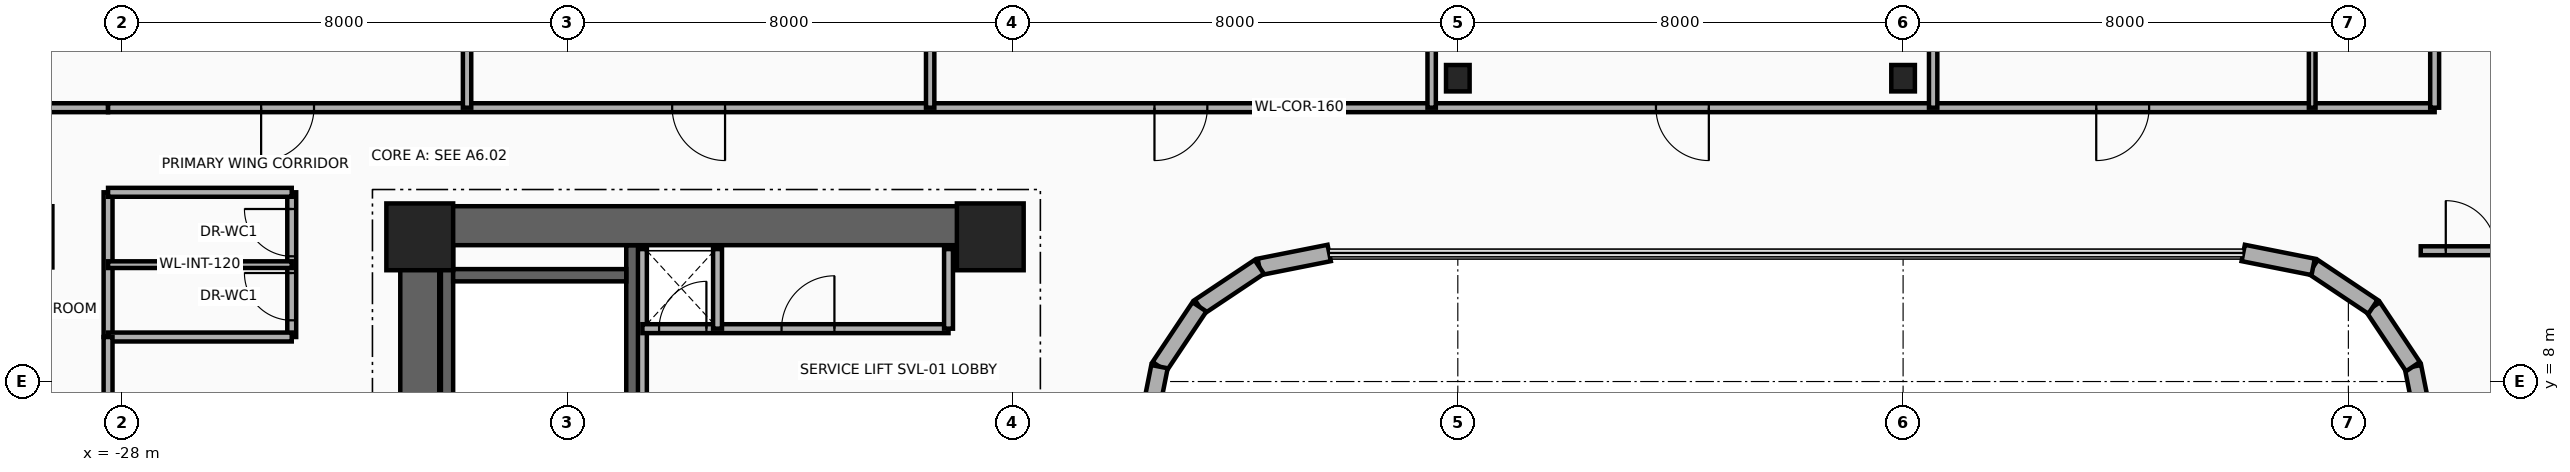
"""IFC4 building model, lengths in metres.
Left out: names, types, materials, properties, quantities, classifications, styles, units other than length and angle.
Written with IfcOpenShell. Run it as: python <this file> out.ifc"""

import sys

from ifc_helpers import new_model, si_unit, direction, frame, frame_2d, origin, origin_2d, place, context, subcontext, project, spatial, rectangle, i_section, extrude, source, transform, mapped, element, fill, save


model = new_model("IFC4")
c1 = context("Model", 3, precision=1e-05, world=origin(), true_north=direction((0.0, 1.0)))
c2 = subcontext(c1, "Body", "Model", "MODEL_VIEW")
j1 = project(units=[si_unit("LENGTHUNIT", "METRE"), si_unit("PLANEANGLEUNIT", "RADIAN")], contexts=[c1])
p1 = place(None, origin())
s1 = spatial("IfcSite", under=j1, at=p1, CompositionType="ELEMENT")
p2 = place(p1, origin())
s2 = spatial("IfcBuilding", under=s1, at=p2, CompositionType="ELEMENT")
p3 = place(p2, frame((0.0, 0.0, 113.1)))
s3 = spatial("IfcBuildingStorey", under=s2, at=p3, CompositionType="ELEMENT", Elevation=113.1)
for number, where, z_axis, x_axis in (
    (1, (-22.16, 1.78, 0.0), (0.0, 0.0, 1.0), (0.0, 1.0, 0.0)),
    (2, (-18.83, 1.78, 0.0), (0.0, 0.0, 1.0), (0.0, 1.0, 0.0)),
):
    element("IfcWall", number, at=place(p3, frame(where, z_axis=z_axis, x_axis=x_axis)), inside=s3, PredefinedType="SHEAR", context=c2, shape_type="SweptSolid", body=[
        extrude(rectangle(XDim=8.67, YDim=0.22, at=frame_2d((4.335, 0.0))), origin(), (0.0, 0.0, 1.0), 3.46),
    ])
p4 = place(p3, frame((-22.05, 9.91, 0.0), z_axis=(0.0, 0.0, 1.0), x_axis=(1.0, 0.0, 0.0)))
e3 = element("IfcWall", 3, at=p4, inside=s3, PredefinedType="SHEAR", context=c2, shape_type="SweptSolid", body=[
    extrude(rectangle(XDim=3.11, YDim=0.22, at=frame_2d((1.555, 0.0))), origin(), (0.0, 0.0, 1.0), 3.46),
])
p5 = place(p3, frame((-22.65, -11.15, 0.0), z_axis=(0.0, 0.0, 1.0), x_axis=(0.0, 1.0, 0.0)))
e4 = element("IfcWall", 4, at=p5, inside=s3, PredefinedType="SHEAR", context=c2, shape_type="SweptSolid", body=[
    extrude(rectangle(XDim=22.3, YDim=0.7, at=frame_2d((11.15, 0.0))), origin(), (0.0, 0.0, 1.0), 3.46),
])
p6 = place(p3, frame((-22.65, 10.8, 0.0), z_axis=(0.0, 0.0, 1.0), x_axis=(1.0, 0.0, 0.0)))
e5 = element("IfcWall", 5, at=p6, inside=s3, PredefinedType="SHEAR", context=c2, shape_type="SweptSolid", body=[
    extrude(rectangle(XDim=10.25, YDim=0.7, at=frame_2d((5.125, 0.0))), origin(), (0.0, 0.0, 1.0), 3.46),
])
m1 = source(origin(), c2, "Body", "SweptSolid", [
    extrude(rectangle(XDim=1.2, YDim=1.2, at=origin_2d()), origin(), (0.0, 0.0, 1.0), 3.7),
])
for number, where, z_axis, x_axis in (
    (6, (-22.65, 10.6, 0.0), (0.0, 0.0, 1.0), (1.0, 0.0, 0.0)),
    (7, (-12.4, 10.6, 0.0), (0.0, 0.0, 1.0), (1.0, 0.0, 0.0)),
):
    element("IfcColumn", number, at=place(p3, frame(where, z_axis=z_axis, x_axis=x_axis)), inside=s3, PredefinedType="COLUMN", context=c2, shape_type="MappedRepresentation", body=[
        mapped(m1, transform((0.0, 0.0, 0.0), x_axis=(1.0, 0.0, 0.0), y_axis=(0.0, 1.0, 0.0), z_axis=(0.0, 0.0, 1.0), scale=1.0)),
    ])
m2 = source(origin(), c2, "Body", "SweptSolid", [
    extrude(i_section(OverallWidth=0.424, OverallDepth=0.474, WebThickness=0.048, FlangeThickness=0.077, at=origin_2d()), origin(), (0.0, 0.0, 1.0), 3.7),
])
for number, where, z_axis, x_axis in (
    (8, (-4.0, 13.45, 0.0), (0.0, 0.0, 1.0), (1.0, 0.0, 0.0)),
    (9, (4.0, 13.45, 0.0), (0.0, 0.0, 1.0), (1.0, 0.0, 0.0)),
):
    element("IfcColumn", number, at=place(p3, frame(where, z_axis=z_axis, x_axis=x_axis)), inside=s3, PredefinedType="COLUMN", context=c2, shape_type="MappedRepresentation", body=[
        mapped(m2, transform((0.0, 0.0, 0.0), x_axis=(1.0, 0.0, 0.0), y_axis=(0.0, 1.0, 0.0), z_axis=(0.0, 0.0, 1.0), scale=1.0)),
    ])
p7 = place(p3, frame((13.41, 7.011, 0.0), z_axis=(0.0, 0.0, 1.0), x_axis=(-0.195090163074, 0.980785312019, 0.0)))
e10 = element("IfcWall", 10, at=p7, inside=s3, PredefinedType="SOLIDWALL", context=c2, shape_type="SweptSolid", body=[
    extrude(rectangle(XDim=1.281, YDim=0.3, at=frame_2d((0.641, 0.0))), origin(), (0.0, 0.0, 1.0), 3.46),
])
for number, where, z_axis, x_axis in (
    (11, (13.16, 8.268, 0.0), (0.0, 0.0, 1.0), (-0.556, 0.831, 0.0)),
    (12, (12.442, 9.342, 0.0), (0.0, 0.0, 1.0), (-0.831, 0.556, 0.0)),
):
    element("IfcWall", number, at=place(p3, frame(where, z_axis=z_axis, x_axis=x_axis)), inside=s3, PredefinedType="SOLIDWALL", context=c2, shape_type="SweptSolid", body=[
        extrude(rectangle(XDim=1.292, YDim=0.3, at=frame_2d((0.646, 0.0))), origin(), (0.0, 0.0, 1.0), 3.46),
    ])
for number, where, z_axis, x_axis in (
    (13, (11.367, 10.06, 0.0), (0.0, 0.0, 1.0), (-0.981, 0.195, 0.0)),
    (14, (-6.311, 10.31, 0.0), (0.0, 0.0, 1.0), (-0.981, -0.195, 0.0)),
):
    element("IfcWall", number, at=place(p3, frame(where, z_axis=z_axis, x_axis=x_axis)), inside=s3, PredefinedType="SOLIDWALL", context=c2, shape_type="SweptSolid", body=[
        extrude(rectangle(XDim=1.281, YDim=0.3, at=frame_2d((0.641, 0.0))), origin(), (0.0, 0.0, 1.0), 3.46),
    ])
p8 = place(p3, frame((-7.567, 10.06, 0.0), z_axis=(0.0, 0.0, 1.0), x_axis=(-0.831497739511, -0.555528135371, 0.0)))
e15 = element("IfcWall", 15, at=p8, inside=s3, PredefinedType="SOLIDWALL", context=c2, shape_type="SweptSolid", body=[
    extrude(rectangle(XDim=1.292, YDim=0.3, at=frame_2d((0.646, 0.0))), origin(), (0.0, 0.0, 1.0), 3.46),
])
p9 = place(p3, frame((-8.642, 9.342, 0.0), z_axis=(0.0, 0.0, 1.0), x_axis=(-0.555615398575, -0.831439431869, 0.0)))
e16 = element("IfcWall", 16, at=p9, inside=s3, PredefinedType="SOLIDWALL", context=c2, shape_type="SweptSolid", body=[
    extrude(rectangle(XDim=1.292, YDim=0.3, at=frame_2d((0.646, 0.0))), origin(), (0.0, 0.0, 1.0), 3.46),
])
p10 = place(p3, frame((-9.36, 8.268, 0.0), z_axis=(0.0, 0.0, 1.0), x_axis=(-0.195090163074, -0.980785312019, 0.0)))
e17 = element("IfcWall", 17, at=p10, inside=s3, PredefinedType="SOLIDWALL", context=c2, shape_type="SweptSolid", body=[
    extrude(rectangle(XDim=1.281, YDim=0.3, at=frame_2d((0.641, 0.0))), origin(), (0.0, 0.0, 1.0), 3.46),
])
p11 = place(p3, frame((-18.65, 7.45, 0.0), z_axis=(0.0, 0.0, 1.0), x_axis=(0.0, 1.0, 0.0)))
e18 = element("IfcWall", 18, at=p11, inside=s3, PredefinedType="PARTITIONING", context=c2, shape_type="SweptSolid", body=[
    extrude(rectangle(XDim=2.93, YDim=0.16, at=frame_2d((1.465, 0.0))), origin(), (0.0, 0.0, 1.0), 3.46),
])
p12 = place(p3, frame((-18.65, 8.95, 0.0), z_axis=(0.0, 0.0, 1.0), x_axis=(1.0, 0.0, 0.0)))
e19 = element("IfcWall", 19, at=p12, inside=s3, PredefinedType="PARTITIONING", context=c2, shape_type="SweptSolid", body=[
    extrude(rectangle(XDim=5.5, YDim=0.16, at=frame_2d((2.75, 0.0))), origin(), (0.0, 0.0, 1.0), 3.46),
])
p13 = place(p12, frame((0.3, 0.0, 0.0)))
e20 = element("IfcOpeningElement", 20, at=p13, cuts=e19, PredefinedType="OPENING", context=c2, shape_type="SweptSolid", body=[
    extrude(rectangle(XDim=0.85, YDim=2.05, at=frame_2d((0.425, 1.025))), frame((0.0, 0.095, 0.0), z_axis=(0.0, -1.0, 0.0), x_axis=(1.0, 0.0, 0.0)), (0.0, 0.0, 1.0), 0.19),
])
p14 = place(p12, frame((2.5, 0.0, 0.0)))
e21 = element("IfcOpeningElement", 21, at=p14, cuts=e19, PredefinedType="OPENING", context=c2, shape_type="SweptSolid", body=[
    extrude(rectangle(XDim=0.95, YDim=2.15, at=frame_2d((0.475, 1.075))), frame((0.0, 0.095, 0.0), z_axis=(0.0, -1.0, 0.0), x_axis=(1.0, 0.0, 0.0)), (0.0, 0.0, 1.0), 0.19),
])
for number, where, z_axis, x_axis in (
    (22, (-13.15, 8.95, 0.0), (0.0, 0.0, 1.0), (0.0, 1.0, 0.0)),
    (23, (-17.3, 8.95, 0.0), (0.0, 0.0, 1.0), (0.0, 1.0, 0.0)),
):
    element("IfcWall", number, at=place(p3, frame(where, z_axis=z_axis, x_axis=x_axis)), inside=s3, PredefinedType="PARTITIONING", context=c2, shape_type="SweptSolid", body=[
        extrude(rectangle(XDim=1.43, YDim=0.16, at=frame_2d((0.715, 0.0))), origin(), (0.0, 0.0, 1.0), 3.46),
    ])
p15 = place(p3, frame((-28.25, 8.8, 0.0), z_axis=(0.0, 0.0, 1.0), x_axis=(0.0, 1.0, 0.0)))
e24 = element("IfcWall", 24, at=p15, inside=s3, PredefinedType="PARTITIONING", context=c2, shape_type="SweptSolid", body=[
    extrude(rectangle(XDim=2.6, YDim=0.16, at=frame_2d((1.3, 0.0))), origin(), (0.0, 0.0, 1.0), 2.666),
])
p16 = place(p3, frame((-24.95, 8.8, 0.0), z_axis=(0.0, 0.0, 1.0), x_axis=(0.0, 1.0, 0.0)))
e25 = element("IfcWall", 25, at=p16, inside=s3, PredefinedType="PARTITIONING", context=c2, shape_type="SweptSolid", body=[
    extrude(rectangle(XDim=2.6, YDim=0.16, at=frame_2d((1.3, 0.0))), origin(), (0.0, 0.0, 1.0), 2.666),
])
p17 = place(p16, frame((0.3, 0.0, 0.0)))
e26 = element("IfcOpeningElement", 26, at=p17, cuts=e25, PredefinedType="OPENING", context=c2, shape_type="SweptSolid", body=[
    extrude(rectangle(XDim=0.85, YDim=2.1, at=frame_2d((0.425, 1.05))), frame((0.0, 0.095, 0.0), z_axis=(0.0, -1.0, 0.0), x_axis=(1.0, 0.0, 0.0)), (0.0, 0.0, 1.0), 0.19),
])
p18 = place(p16, frame((1.45, 0.0, 0.0)))
e27 = element("IfcOpeningElement", 27, at=p18, cuts=e25, PredefinedType="OPENING", context=c2, shape_type="SweptSolid", body=[
    extrude(rectangle(XDim=0.85, YDim=2.1, at=frame_2d((0.425, 1.05))), frame((0.0, 0.095, 0.0), z_axis=(0.0, -1.0, 0.0), x_axis=(1.0, 0.0, 0.0)), (0.0, 0.0, 1.0), 0.19),
])
for number, where, z_axis, x_axis in (
    (28, (-28.25, 8.8, 0.0), (0.0, 0.0, 1.0), (1.0, 0.0, 0.0)),
    (29, (-28.25, 11.4, 0.0), (0.0, 0.0, 1.0), (1.0, 0.0, 0.0)),
):
    element("IfcWall", number, at=place(p3, frame(where, z_axis=z_axis, x_axis=x_axis)), inside=s3, PredefinedType="PARTITIONING", context=c2, shape_type="SweptSolid", body=[
        extrude(rectangle(XDim=3.3, YDim=0.16, at=frame_2d((1.65, 0.0))), origin(), (0.0, 0.0, 1.0), 3.46),
    ])
p19 = place(p3, frame((-28.25, 10.1, 0.0), z_axis=(0.0, 0.0, 1.0), x_axis=(1.0, 0.0, 0.0)))
e30 = element("IfcWall", 30, at=p19, inside=s3, PredefinedType="PARTITIONING", context=c2, shape_type="SweptSolid", body=[
    extrude(rectangle(XDim=3.3, YDim=0.12, at=frame_2d((1.65, 0.0))), origin(), (0.0, 0.0, 1.0), 3.46),
])
p20 = place(p3, frame((-28.25, 5.8, 0.0), z_axis=(0.0, 0.0, 1.0), x_axis=(0.0, 1.0, 0.0)))
e31 = element("IfcWall", 31, at=p20, inside=s3, PredefinedType="PARTITIONING", context=c2, shape_type="SweptSolid", body=[
    extrude(rectangle(XDim=3.0, YDim=0.16, at=frame_2d((1.5, 0.0))), origin(), (0.0, 0.0, 1.0), 2.988),
])
p21 = place(p3, frame((-30.89, 12.92, 0.0), z_axis=(0.0, 0.0, 1.0), x_axis=(1.0, 0.0, 0.0)))
e32 = element("IfcWall", 32, at=p21, inside=s3, PredefinedType="PARTITIONING", context=c2, shape_type="SweptSolid", body=[
    extrude(rectangle(XDim=2.64, YDim=0.16, at=frame_2d((1.32, 0.0))), origin(), (0.0, 0.0, 1.0), 2.896),
])
p22 = place(p3, frame((-28.25, 12.92, 0.0), z_axis=(0.0, 0.0, 1.0), x_axis=(1.0, 0.0, 0.0)))
e33 = element("IfcWall", 33, at=p22, inside=s3, PredefinedType="PARTITIONING", context=c2, shape_type="SweptSolid", body=[
    extrude(rectangle(XDim=41.8, YDim=0.16, at=frame_2d((20.9, 0.0))), origin(), (0.0, 0.0, 1.0), 2.666),
])
p23 = place(p22, frame((2.75, 0.0, 0.0)))
e34 = element("IfcOpeningElement", 34, at=p23, cuts=e33, PredefinedType="OPENING", context=c2, shape_type="SweptSolid", body=[
    extrude(rectangle(XDim=0.95, YDim=2.15, at=frame_2d((0.475, 1.075))), frame((0.0, 0.095, 0.0), z_axis=(0.0, -1.0, 0.0), x_axis=(1.0, 0.0, 0.0)), (0.0, 0.0, 1.0), 0.19),
])
p24 = place(p22, frame((10.135, 0.0, 0.0)))
e35 = element("IfcOpeningElement", 35, at=p24, cuts=e33, PredefinedType="OPENING", context=c2, shape_type="SweptSolid", body=[
    extrude(rectangle(XDim=0.95, YDim=2.15, at=frame_2d((0.475, 1.075))), frame((0.0, 0.095, 0.0), z_axis=(0.0, -1.0, 0.0), x_axis=(1.0, 0.0, 0.0)), (0.0, 0.0, 1.0), 0.19),
])
p25 = place(p22, frame((18.8, 0.0, 0.0)))
e36 = element("IfcOpeningElement", 36, at=p25, cuts=e33, PredefinedType="OPENING", context=c2, shape_type="SweptSolid", body=[
    extrude(rectangle(XDim=0.95, YDim=2.15, at=frame_2d((0.475, 1.075))), frame((0.0, 0.095, 0.0), z_axis=(0.0, -1.0, 0.0), x_axis=(1.0, 0.0, 0.0)), (0.0, 0.0, 1.0), 0.19),
])
p26 = place(p22, frame((27.81, 0.0, 0.0)))
e37 = element("IfcOpeningElement", 37, at=p26, cuts=e33, PredefinedType="OPENING", context=c2, shape_type="SweptSolid", body=[
    extrude(rectangle(XDim=0.95, YDim=2.15, at=frame_2d((0.475, 1.075))), frame((0.0, 0.095, 0.0), z_axis=(0.0, -1.0, 0.0), x_axis=(1.0, 0.0, 0.0)), (0.0, 0.0, 1.0), 0.19),
])
p27 = place(p22, frame((35.72, 0.0, 0.0)))
e38 = element("IfcOpeningElement", 38, at=p27, cuts=e33, PredefinedType="OPENING", context=c2, shape_type="SweptSolid", body=[
    extrude(rectangle(XDim=0.95, YDim=2.15, at=frame_2d((0.475, 1.075))), frame((0.0, 0.095, 0.0), z_axis=(0.0, -1.0, 0.0), x_axis=(1.0, 0.0, 0.0)), (0.0, 0.0, 1.0), 0.19),
])
p28 = place(p3, frame((13.55, 12.92, 0.0), z_axis=(0.0, 0.0, 1.0), x_axis=(0.0, 1.0, 0.0)))
e39 = element("IfcWall", 39, at=p28, inside=s3, PredefinedType="PARTITIONING", context=c2, shape_type="SweptSolid", body=[
    extrude(rectangle(XDim=5.857, YDim=0.16, at=frame_2d((2.928, 0.0))), origin(), (0.0, 0.0, 1.0), 2.666),
])
p29 = place(p3, frame((-21.8, 12.92, 0.0), z_axis=(0.0, 0.0, 1.0), x_axis=(0.0, 1.0, 0.0)))
e40 = element("IfcWall", 40, at=p29, inside=s3, PredefinedType="PARTITIONING", context=c2, shape_type="SweptSolid", body=[
    extrude(rectangle(XDim=6.552, YDim=0.15, at=frame_2d((3.276, 0.0))), origin(), (0.0, 0.0, 1.0), 2.666),
])
p30 = place(p3, frame((-13.48, 12.92, 0.0), z_axis=(0.0, 0.0, 1.0), x_axis=(0.0, 1.0, 0.0)))
e41 = element("IfcWall", 41, at=p30, inside=s3, PredefinedType="PARTITIONING", context=c2, shape_type="SweptSolid", body=[
    extrude(rectangle(XDim=7.259, YDim=0.15, at=frame_2d((3.629, 0.0))), origin(), (0.0, 0.0, 1.0), 2.666),
])
p31 = place(p3, frame((-4.47, 12.92, 0.0), z_axis=(0.0, 0.0, 1.0), x_axis=(0.0, 1.0, 0.0)))
e42 = element("IfcWall", 42, at=p31, inside=s3, PredefinedType="PARTITIONING", context=c2, shape_type="SweptSolid", body=[
    extrude(rectangle(XDim=7.173, YDim=0.15, at=frame_2d((3.586, 0.0))), origin(), (0.0, 0.0, 1.0), 2.666),
])
p32 = place(p3, frame((4.54, 12.92, 0.0), z_axis=(0.0, 0.0, 1.0), x_axis=(0.0, 1.0, 0.0)))
e43 = element("IfcWall", 43, at=p32, inside=s3, PredefinedType="PARTITIONING", context=c2, shape_type="SweptSolid", body=[
    extrude(rectangle(XDim=6.764, YDim=0.15, at=frame_2d((3.382, 0.0))), origin(), (0.0, 0.0, 1.0), 2.666),
])
p33 = place(p3, frame((11.35, 12.92, 0.0), z_axis=(0.0, 0.0, 1.0), x_axis=(0.0, 1.0, 0.0)))
e44 = element("IfcWall", 44, at=p33, inside=s3, PredefinedType="PARTITIONING", context=c2, shape_type="SweptSolid", body=[
    extrude(rectangle(XDim=2.0, YDim=0.12, at=frame_2d((1.0, 0.0))), origin(), (0.0, 0.0, 1.0), 2.666),
])
p34 = place(p3, frame((13.3, 10.35, 0.0), z_axis=(0.0, 0.0, 1.0), x_axis=(1.0, 0.0, 0.0)))
e45 = element("IfcWall", 45, at=p34, inside=s3, PredefinedType="PARTITIONING", context=c2, shape_type="SweptSolid", body=[
    extrude(rectangle(XDim=2.1, YDim=0.16, at=frame_2d((1.05, 0.0))), origin(), (0.0, 0.0, 1.0), 2.666),
])
p35 = place(p34, frame((0.45, 0.0, 0.0)))
e46 = element("IfcOpeningElement", 46, at=p35, cuts=e45, PredefinedType="OPENING", context=c2, shape_type="SweptSolid", body=[
    extrude(rectangle(XDim=0.9, YDim=2.1, at=frame_2d((0.45, 1.05))), frame((0.0, 0.095, 0.0), z_axis=(0.0, -1.0, 0.0), x_axis=(1.0, 0.0, 0.0)), (0.0, 0.0, 1.0), 0.19),
])
p36 = place(p13, origin())
e47 = element("IfcDoor", 47, at=p36, inside=s3, OperationType="SINGLE_SWING_LEFT", PredefinedType="DOOR", context=c2, shape_type="SweptSolid", body=[
    extrude(rectangle(XDim=0.85, YDim=2.05, at=frame_2d((0.425, 1.025))), frame((0.0, 0.025, 0.0), z_axis=(0.0, -1.0, 0.0), x_axis=(1.0, 0.0, 0.0)), (0.0, 0.0, 1.0), 0.05),
])
fill(e20, e47)
p37 = place(p14, origin())
e48 = element("IfcDoor", 48, at=p37, inside=s3, OperationType="SINGLE_SWING_RIGHT", PredefinedType="DOOR", context=c2, shape_type="SweptSolid", body=[
    extrude(rectangle(XDim=0.95, YDim=2.15, at=frame_2d((0.475, 1.075))), frame((0.0, 0.025, 0.0), z_axis=(0.0, -1.0, 0.0), x_axis=(1.0, 0.0, 0.0)), (0.0, 0.0, 1.0), 0.05),
])
fill(e21, e48)
p38 = place(p17, origin())
e49 = element("IfcDoor", 49, at=p38, inside=s3, OperationType="SINGLE_SWING_RIGHT", PredefinedType="DOOR", context=c2, shape_type="SweptSolid", body=[
    extrude(rectangle(XDim=0.85, YDim=2.1, at=frame_2d((0.425, 1.05))), frame((0.0, 0.025, 0.0), z_axis=(0.0, -1.0, 0.0), x_axis=(1.0, 0.0, 0.0)), (0.0, 0.0, 1.0), 0.05),
])
fill(e26, e49)
p39 = place(p18, origin())
e50 = element("IfcDoor", 50, at=p39, inside=s3, OperationType="SINGLE_SWING_LEFT", PredefinedType="DOOR", context=c2, shape_type="SweptSolid", body=[
    extrude(rectangle(XDim=0.85, YDim=2.1, at=frame_2d((0.425, 1.05))), frame((0.0, 0.025, 0.0), z_axis=(0.0, -1.0, 0.0), x_axis=(1.0, 0.0, 0.0)), (0.0, 0.0, 1.0), 0.05),
])
fill(e27, e50)
p40 = place(p23, frame((0.95, 0.0, 0.0), z_axis=(0.0, 0.0, 1.0), x_axis=(-1.0, 0.0, 0.0)))
e51 = element("IfcDoor", 51, at=p40, inside=s3, OperationType="SINGLE_SWING_LEFT", PredefinedType="DOOR", context=c2, shape_type="SweptSolid", body=[
    extrude(rectangle(XDim=0.95, YDim=2.15, at=frame_2d((0.475, 1.075))), frame((0.0, 0.025, 0.0), z_axis=(0.0, -1.0, 0.0), x_axis=(1.0, 0.0, 0.0)), (0.0, 0.0, 1.0), 0.05),
])
fill(e34, e51)
p41 = place(p24, frame((0.95, 0.0, 0.0), z_axis=(0.0, 0.0, 1.0), x_axis=(-1.0, 0.0, 0.0)))
e52 = element("IfcDoor", 52, at=p41, inside=s3, OperationType="SINGLE_SWING_LEFT", PredefinedType="DOOR", context=c2, shape_type="SweptSolid", body=[
    extrude(rectangle(XDim=0.95, YDim=2.15, at=frame_2d((0.475, 1.075))), frame((0.0, 0.025, 0.0), z_axis=(0.0, -1.0, 0.0), x_axis=(1.0, 0.0, 0.0)), (0.0, 0.0, 1.0), 0.05),
])
fill(e35, e52)
p42 = place(p25, frame((0.95, 0.0, 0.0), z_axis=(0.0, 0.0, 1.0), x_axis=(-1.0, 0.0, 0.0)))
e53 = element("IfcDoor", 53, at=p42, inside=s3, OperationType="SINGLE_SWING_LEFT", PredefinedType="DOOR", context=c2, shape_type="SweptSolid", body=[
    extrude(rectangle(XDim=0.95, YDim=2.15, at=frame_2d((0.475, 1.075))), frame((0.0, 0.025, 0.0), z_axis=(0.0, -1.0, 0.0), x_axis=(1.0, 0.0, 0.0)), (0.0, 0.0, 1.0), 0.05),
])
fill(e36, e53)
p43 = place(p26, frame((0.95, 0.0, 0.0), z_axis=(0.0, 0.0, 1.0), x_axis=(-1.0, 0.0, 0.0)))
e54 = element("IfcDoor", 54, at=p43, inside=s3, OperationType="SINGLE_SWING_LEFT", PredefinedType="DOOR", context=c2, shape_type="SweptSolid", body=[
    extrude(rectangle(XDim=0.95, YDim=2.15, at=frame_2d((0.475, 1.075))), frame((0.0, 0.025, 0.0), z_axis=(0.0, -1.0, 0.0), x_axis=(1.0, 0.0, 0.0)), (0.0, 0.0, 1.0), 0.05),
])
fill(e37, e54)
p44 = place(p27, frame((0.95, 0.0, 0.0), z_axis=(0.0, 0.0, 1.0), x_axis=(-1.0, 0.0, 0.0)))
e55 = element("IfcDoor", 55, at=p44, inside=s3, OperationType="SINGLE_SWING_LEFT", PredefinedType="DOOR", context=c2, shape_type="SweptSolid", body=[
    extrude(rectangle(XDim=0.95, YDim=2.15, at=frame_2d((0.475, 1.075))), frame((0.0, 0.025, 0.0), z_axis=(0.0, -1.0, 0.0), x_axis=(1.0, 0.0, 0.0)), (0.0, 0.0, 1.0), 0.05),
])
fill(e38, e55)
p45 = place(p35, origin())
e56 = element("IfcDoor", 56, at=p45, inside=s3, OperationType="SINGLE_SWING_LEFT", PredefinedType="DOOR", context=c2, shape_type="SweptSolid", body=[
    extrude(rectangle(XDim=0.9, YDim=2.1, at=frame_2d((0.45, 1.05))), frame((0.0, 0.025, 0.0), z_axis=(0.0, -1.0, 0.0), x_axis=(1.0, 0.0, 0.0)), (0.0, 0.0, 1.0), 0.05),
])
fill(e46, e56)
save(model, sys.argv[1])
